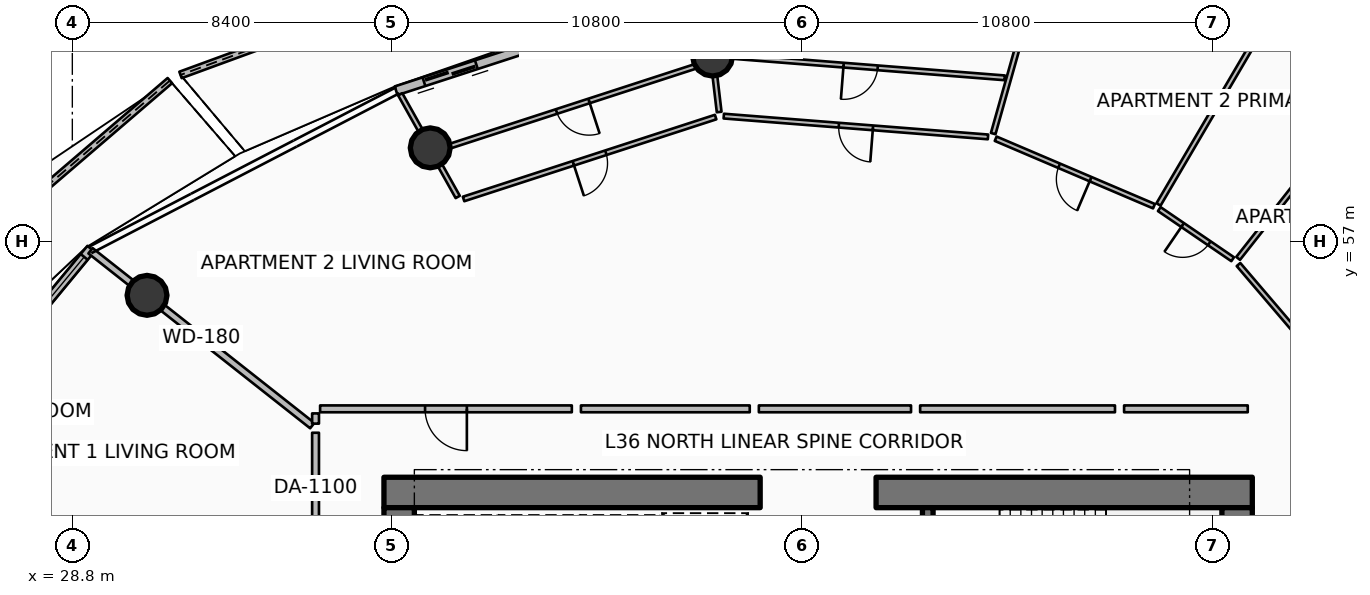
"""IFC4 building model, lengths in metres.
Left out: names, types, materials, properties, quantities, classifications, styles, units other than length and angle.
Written with IfcOpenShell. Run it as: python <this file> out.ifc"""

import sys

from ifc_helpers import new_model, si_unit, direction, frame, frame_2d, origin, origin_2d, place, context, subcontext, project, spatial, polyline, rectangle, circle, outline, extrude, element, fill, save


model = new_model("IFC4")
c1 = context("Model", 3, precision=1e-05, world=origin(), true_north=direction((0.0, 1.0)))
c2 = subcontext(c1, "Body", "Model", "MODEL_VIEW")
j1 = project(units=[si_unit("LENGTHUNIT", "METRE"), si_unit("PLANEANGLEUNIT", "RADIAN")], contexts=[c1])
p1 = place(None, origin())
s1 = spatial("IfcSite", under=j1, at=p1, CompositionType="ELEMENT")
p2 = place(p1, origin())
s2 = spatial("IfcBuilding", under=s1, at=p2, CompositionType="ELEMENT")
p3 = place(p2, frame((0.0, 0.0, 146.55)))
s3 = spatial("IfcBuildingStorey", under=s2, at=p3, CompositionType="ELEMENT", Elevation=146.55)
p4 = place(p3, frame((37.0, 50.4, 0.0), z_axis=(0.0, 0.0, 1.0), x_axis=(1.0, 0.0, 0.0)))
e1 = element("IfcWall", 1, at=p4, inside=s3, PredefinedType="SHEAR", context=c2, shape_type="SweptSolid", body=[
    extrude(rectangle(XDim=9.9, YDim=0.8, at=frame_2d((4.95, 0.0))), origin(), (0.0, 0.0, 1.0), 3.75),
])
p5 = place(p3, frame((49.95, 50.4, 0.0), z_axis=(0.0, 0.0, 1.0), x_axis=(1.0, 0.0, 0.0)))
e2 = element("IfcWall", 2, at=p5, inside=s3, PredefinedType="SHEAR", context=c2, shape_type="SweptSolid", body=[
    extrude(rectangle(XDim=9.9, YDim=0.8, at=frame_2d((4.95, 0.0))), origin(), (0.0, 0.0, 1.0), 3.75),
])
for number, where, z_axis, x_axis in (
    (3, (37.4, 34.0, 0.0), (0.0, 0.0, 1.0), (0.0, 1.0, 0.0)),
    (4, (59.45, 34.0, 0.0), (0.0, 0.0, 1.0), (0.0, 1.0, 0.0)),
):
    element("IfcWall", number, at=place(p3, frame(where, z_axis=z_axis, x_axis=x_axis)), inside=s3, PredefinedType="SHEAR", context=c2, shape_type="SweptSolid", body=[
        extrude(rectangle(XDim=16.0, YDim=0.8, at=frame_2d((8.0, 0.0))), origin(), (0.0, 0.0, 1.0), 3.75),
    ])
p6 = place(p3, frame((51.31, 46.5, 0.0), z_axis=(0.0, 0.0, 1.0), x_axis=(0.0, 1.0, 0.0)))
e5 = element("IfcWall", 5, at=p6, inside=s3, PredefinedType="SHEAR", context=c2, shape_type="SweptSolid", body=[
    extrude(rectangle(XDim=3.5, YDim=0.28, at=frame_2d((1.75, 0.0))), origin(), (0.0, 0.0, 1.0), 3.75),
])
for number, where, z_axis, x_axis in (
    (6, (45.647, 61.881, 0.0), (0.0, 0.0, 1.0), (1.0, 0.0, 0.0)),
    (7, (38.218, 59.467, 0.0), (0.0, 0.0, 1.0), (1.0, 0.0, 0.0)),
    (8, (30.766, 55.586, 0.0), (0.0, 0.0, 1.0), (1.0, 0.0, 0.0)),
):
    element("IfcColumn", number, at=place(p3, frame(where, z_axis=z_axis, x_axis=x_axis)), inside=s3, PredefinedType="COLUMN", context=c2, shape_type="SweptSolid", body=[
        extrude(circle(Radius=0.525, at=origin_2d()), origin(), (0.0, 0.0, 1.0), 3.5),
    ])
p7 = place(p3, frame((69.89, 60.928, 0.0), z_axis=(0.0, 0.0, 1.0), x_axis=(-0.890197806796, 0.455574214345, 0.0)))
e9 = element("IfcWall", 9, at=p7, inside=s3, PredefinedType="PARAPET", context=c2, shape_type="SweptSolid", body=[
    extrude(outline(polyline([(0.0, 0.0), (10.791, 0.0), (10.791, 1.148), (5.395, 1.284), (0.0, 1.483), (0.0, 0.0)])), frame((0.0, 0.09, 0.0), z_axis=(0.0, -1.0, 0.0), x_axis=(1.0, 0.0, 0.0)), (0.0, 0.0, 1.0), 0.18),
])
p8 = place(p3, frame((40.518, 64.638, 0.0), z_axis=(0.0, 0.0, 1.0), x_axis=(-0.93889246029, -0.344210615774, 0.0)))
e10 = element("IfcWall", 10, at=p8, inside=s3, PredefinedType="PARAPET", context=c2, shape_type="SweptSolid", body=[
    extrude(outline(polyline([(0.0, 0.0), (9.449, 0.0), (9.449, 1.86), (4.725, 1.798), (0.0, 1.632), (0.0, 0.0)])), frame((0.0, 0.09, 0.0), z_axis=(0.0, -1.0, 0.0), x_axis=(1.0, 0.0, 0.0)), (0.0, 0.0, 1.0), 0.18),
])
p9 = place(p3, frame((31.366, 61.237, 0.0), z_axis=(0.0, 0.0, 1.0), x_axis=(-0.758999279374, -0.651091463551, 0.0)))
e11 = element("IfcWall", 11, at=p9, inside=s3, PredefinedType="PARAPET", context=c2, shape_type="SweptSolid", body=[
    extrude(outline(polyline([(0.0, 0.0), (10.249, 0.0), (10.249, 1.632), (5.125, 1.798), (0.0, 1.86), (0.0, 0.0)])), frame((0.0, 0.09, 0.0), z_axis=(0.0, -1.0, 0.0), x_axis=(1.0, 0.0, 0.0)), (0.0, 0.0, 1.0), 0.18),
])
p10 = place(p3, frame((45.49, 63.624, 0.0), z_axis=(0.0, 0.0, 1.0), x_axis=(-0.951046390632, -0.309048156224, 0.0)))
e12 = element("IfcWall", 12, at=p10, inside=s3, PredefinedType="SOLIDWALL", context=c2, shape_type="SweptSolid", body=[
    extrude(rectangle(XDim=8.59, YDim=0.24, at=frame_2d((4.295, 0.0))), origin(), (0.0, 0.0, 1.0), 2.45),
])
p11 = place(p10, frame((6.37, 0.0, 0.0)))
e13 = element("IfcOpeningElement", 13, at=p11, cuts=e12, PredefinedType="OPENING", context=c2, shape_type="SweptSolid", body=[
    extrude(rectangle(XDim=1.45, YDim=2.15, at=frame_2d((0.725, 1.075))), frame((0.0, 0.13, 0.0), z_axis=(0.0, -1.0, 0.0), x_axis=(1.0, 0.0, 0.0)), (0.0, 0.0, 1.0), 0.26),
])
p12 = place(p10, frame((0.28, 0.0, 0.65)))
e14 = element("IfcOpeningElement", 14, at=p12, cuts=e12, PredefinedType="OPENING", context=c2, shape_type="SweptSolid", body=[
    extrude(rectangle(XDim=1.6, YDim=1.5, at=frame_2d((0.8, 0.75))), frame((0.0, 0.13, 0.0), z_axis=(0.0, -1.0, 0.0), x_axis=(1.0, 0.0, 0.0)), (0.0, 0.0, 1.0), 0.26),
])
p13 = place(p3, frame((29.291, 56.813, 0.0), z_axis=(0.0, 0.0, 1.0), x_axis=(-0.636771922292, -0.77105221547, 0.0)))
e15 = element("IfcWall", 15, at=p13, inside=s3, PredefinedType="SOLIDWALL", context=c2, shape_type="SweptSolid", body=[
    extrude(rectangle(XDim=10.082, YDim=0.24, at=frame_2d((5.041, 0.0))), origin(), (0.0, 0.0, 1.0), 2.45),
])
p14 = place(p13, frame((7.862, 0.0, 0.0)))
e16 = element("IfcOpeningElement", 16, at=p14, cuts=e15, PredefinedType="OPENING", context=c2, shape_type="SweptSolid", body=[
    extrude(rectangle(XDim=1.45, YDim=2.15, at=frame_2d((0.725, 1.075))), frame((0.0, 0.13, 0.0), z_axis=(0.0, -1.0, 0.0), x_axis=(1.0, 0.0, 0.0)), (0.0, 0.0, 1.0), 0.26),
])
p15 = place(p13, frame((0.28, 0.0, 0.65)))
e17 = element("IfcOpeningElement", 17, at=p15, cuts=e15, PredefinedType="OPENING", context=c2, shape_type="SweptSolid", body=[
    extrude(rectangle(XDim=1.6, YDim=1.5, at=frame_2d((0.8, 0.75))), frame((0.0, 0.13, 0.0), z_axis=(0.0, -1.0, 0.0), x_axis=(1.0, 0.0, 0.0)), (0.0, 0.0, 1.0), 0.26),
])
p16 = place(p3, frame((35.114, 52.159, 0.0), z_axis=(0.0, 0.0, 1.0), x_axis=(-0.78531739611, 0.619093359169, 0.0)))
e18 = element("IfcWall", 18, at=p16, inside=s3, PredefinedType="PARTITIONING", context=c2, shape_type="SweptSolid", body=[
    extrude(rectangle(XDim=7.43, YDim=0.18, at=frame_2d((3.715, 0.0))), origin(), (0.0, 0.0, 1.0), 2.94),
])
p17 = place(p3, frame((35.2, 51.971, 0.0), z_axis=(0.0, 0.0, 1.0), x_axis=(0.0, -1.0, 0.0)))
e19 = element("IfcWall", 19, at=p17, inside=s3, PredefinedType="PARTITIONING", context=c2, shape_type="SweptSolid", body=[
    extrude(rectangle(XDim=6.241, YDim=0.18, at=frame_2d((3.12, 0.0))), origin(), (0.0, 0.0, 1.0), 2.94),
])
p18 = place(p17, frame((2.57, 0.0, 0.0)))
e20 = element("IfcOpeningElement", 20, at=p18, cuts=e19, PredefinedType="OPENING", context=c2, shape_type="SweptSolid", body=[
    extrude(rectangle(XDim=1.1, YDim=2.1, at=frame_2d((0.55, 1.05))), frame((0.0, 0.1, 0.0), z_axis=(0.0, -1.0, 0.0), x_axis=(1.0, 0.0, 0.0)), (0.0, 0.0, 1.0), 0.2),
])
p19 = place(p3, frame((41.944, 52.6, 0.0), z_axis=(0.0, 0.0, 1.0), x_axis=(-1.0, 0.0, 0.0)))
e21 = element("IfcWall", 21, at=p19, inside=s3, PredefinedType="PARTITIONING", context=c2, shape_type="SweptSolid", body=[
    extrude(rectangle(XDim=6.624, YDim=0.18, at=frame_2d((3.312, 0.0))), origin(), (0.0, 0.0, 1.0), 2.94),
])
p20 = place(p19, frame((2.762, 0.0, 0.0)))
e22 = element("IfcOpeningElement", 22, at=p20, cuts=e21, PredefinedType="OPENING", context=c2, shape_type="SweptSolid", body=[
    extrude(rectangle(XDim=1.1, YDim=2.1, at=frame_2d((0.55, 1.05))), frame((0.0, 0.1, 0.0), z_axis=(0.0, -1.0, 0.0), x_axis=(1.0, 0.0, 0.0)), (0.0, 0.0, 1.0), 0.2),
])
p21 = place(p3, frame((35.2, 52.48, 0.0), z_axis=(0.0, 0.0, 1.0), x_axis=(0.0, -1.0, 0.0)))
e23 = element("IfcWall", 23, at=p21, inside=s3, PredefinedType="PARTITIONING", context=c2, shape_type="SweptSolid", body=[
    extrude(rectangle(XDim=0.269, YDim=0.18, at=frame_2d((0.135, 0.0))), origin(), (0.0, 0.0, 1.0), 2.94),
])
p22 = place(p3, frame((59.73, 52.6, 0.0), z_axis=(0.0, 0.0, 1.0), x_axis=(-1.0, 0.0, 0.0)))
e24 = element("IfcWall", 24, at=p22, inside=s3, PredefinedType="PARTITIONING", context=c2, shape_type="SweptSolid", body=[
    extrude(rectangle(XDim=3.254, YDim=0.18, at=frame_2d((1.627, 0.0))), origin(), (0.0, 0.0, 1.0), 2.94),
])
p23 = place(p3, frame((64.017, 51.093, 0.0), z_axis=(0.0, 0.0, 1.0), x_axis=(-0.649447060425, 0.76040680935, 0.0)))
e25 = element("IfcWall", 25, at=p23, inside=s3, PredefinedType="PARTITIONING", context=c2, shape_type="SweptSolid", body=[
    extrude(rectangle(XDim=6.975, YDim=0.125, at=frame_2d((3.487, 0.0))), origin(), (0.0, 0.0, 1.0), 2.94),
])
p24 = place(p23, frame((3.037, 0.0, 0.0)))
e26 = element("IfcOpeningElement", 26, at=p24, cuts=e25, PredefinedType="OPENING", context=c2, shape_type="SweptSolid", body=[
    extrude(rectangle(XDim=0.9, YDim=2.08, at=frame_2d((0.45, 1.04))), frame((0.0, 0.073, 0.0), z_axis=(0.0, -1.0, 0.0), x_axis=(1.0, 0.0, 0.0)), (0.0, 0.0, 1.0), 0.145),
])
p25 = place(p3, frame((56.236, 52.6, 0.0), z_axis=(0.0, 0.0, 1.0), x_axis=(-1.0, 0.0, 0.0)))
e27 = element("IfcWall", 27, at=p25, inside=s3, PredefinedType="PARTITIONING", context=c2, shape_type="SweptSolid", body=[
    extrude(rectangle(XDim=5.127, YDim=0.18, at=frame_2d((2.563, 0.0))), origin(), (0.0, 0.0, 1.0), 2.94),
])
p26 = place(p3, frame((59.477, 56.559, 0.0), z_axis=(0.0, 0.0, 1.0), x_axis=(0.619110986016, 0.785303499925, 0.0)))
e28 = element("IfcWall", 28, at=p26, inside=s3, PredefinedType="PARTITIONING", context=c2, shape_type="SweptSolid", body=[
    extrude(rectangle(XDim=7.513, YDim=0.125, at=frame_2d((3.756, 0.0))), origin(), (0.0, 0.0, 1.0), 2.94),
])
p27 = place(p3, frame((57.382, 57.978, 0.0), z_axis=(0.0, 0.0, 1.0), x_axis=(0.506339561396, 0.862334186128, 0.0)))
e29 = element("IfcWall", 29, at=p27, inside=s3, PredefinedType="PARTITIONING", context=c2, shape_type="SweptSolid", body=[
    extrude(rectangle(XDim=6.163, YDim=0.125, at=frame_2d((3.081, 0.0))), origin(), (0.0, 0.0, 1.0), 2.94),
])
p28 = place(p3, frame((59.333, 56.537, 0.0), z_axis=(0.0, 0.0, 1.0), x_axis=(-0.825780816813, 0.563991172434, 0.0)))
e30 = element("IfcWall", 30, at=p28, inside=s3, PredefinedType="PARTITIONING", context=c2, shape_type="SweptSolid", body=[
    extrude(rectangle(XDim=2.338, YDim=0.125, at=frame_2d((1.169, 0.0))), origin(), (0.0, 0.0, 1.0), 2.94),
])
p29 = place(p28, frame((0.744, 0.0, 0.0)))
e31 = element("IfcOpeningElement", 31, at=p29, cuts=e30, PredefinedType="OPENING", context=c2, shape_type="SweptSolid", body=[
    extrude(rectangle(XDim=0.85, YDim=2.06, at=frame_2d((0.425, 1.03))), frame((0.0, 0.073, 0.0), z_axis=(0.0, -1.0, 0.0), x_axis=(1.0, 0.0, 0.0)), (0.0, 0.0, 1.0), 0.145),
])
p30 = place(p3, frame((57.263, 57.932, 0.0), z_axis=(0.0, 0.0, 1.0), x_axis=(-0.919910192906, 0.392129107549, 0.0)))
e32 = element("IfcWall", 32, at=p30, inside=s3, PredefinedType="PARTITIONING", context=c2, shape_type="SweptSolid", body=[
    extrude(rectangle(XDim=4.528, YDim=0.125, at=frame_2d((2.264, 0.0))), origin(), (0.0, 0.0, 1.0), 2.94),
])
p31 = place(p30, frame((1.814, 0.0, 0.0)))
e33 = element("IfcOpeningElement", 33, at=p31, cuts=e32, PredefinedType="OPENING", context=c2, shape_type="SweptSolid", body=[
    extrude(rectangle(XDim=0.9, YDim=2.08, at=frame_2d((0.45, 1.04))), frame((0.0, 0.073, 0.0), z_axis=(0.0, -1.0, 0.0), x_axis=(1.0, 0.0, 0.0)), (0.0, 0.0, 1.0), 0.145),
])
p32 = place(p3, frame((50.869, 52.6, 0.0), z_axis=(0.0, 0.0, 1.0), x_axis=(-1.0, 0.0, 0.0)))
e34 = element("IfcWall", 34, at=p32, inside=s3, PredefinedType="PARTITIONING", context=c2, shape_type="SweptSolid", body=[
    extrude(rectangle(XDim=4.004, YDim=0.18, at=frame_2d((2.002, 0.0))), origin(), (0.0, 0.0, 1.0), 2.94),
])
p33 = place(p3, frame((53.032, 59.843, 0.0), z_axis=(0.0, 0.0, 1.0), x_axis=(0.271445669276, 0.962453764412, 0.0)))
e35 = element("IfcWall", 35, at=p33, inside=s3, PredefinedType="PARTITIONING", context=c2, shape_type="SweptSolid", body=[
    extrude(rectangle(XDim=5.2, YDim=0.125, at=frame_2d((2.6, 0.0))), origin(), (0.0, 0.0, 1.0), 2.94),
])
p34 = place(p3, frame((52.896, 59.755, 0.0), z_axis=(0.0, 0.0, 1.0), x_axis=(-0.996918496177, 0.078444324085, 0.0)))
e36 = element("IfcWall", 36, at=p34, inside=s3, PredefinedType="PARTITIONING", context=c2, shape_type="SweptSolid", body=[
    extrude(rectangle(XDim=6.975, YDim=0.125, at=frame_2d((3.487, 0.0))), origin(), (0.0, 0.0, 1.0), 2.94),
])
p35 = place(p34, frame((3.037, 0.0, 0.0)))
e37 = element("IfcOpeningElement", 37, at=p35, cuts=e36, PredefinedType="OPENING", context=c2, shape_type="SweptSolid", body=[
    extrude(rectangle(XDim=0.9, YDim=2.08, at=frame_2d((0.45, 1.04))), frame((0.0, 0.073, 0.0), z_axis=(0.0, -1.0, 0.0), x_axis=(1.0, 0.0, 0.0)), (0.0, 0.0, 1.0), 0.145),
])
p36 = place(p3, frame((53.334, 61.31, 0.0), z_axis=(0.0, 0.0, 1.0), x_axis=(-0.996916945499, 0.078464028559, 0.0)))
e38 = element("IfcWall", 38, at=p36, inside=s3, PredefinedType="PARTITIONING", context=c2, shape_type="SweptSolid", body=[
    extrude(rectangle(XDim=7.604, YDim=0.125, at=frame_2d((3.802, 0.0))), origin(), (0.0, 0.0, 1.0), 2.94),
])
p37 = place(p36, frame((3.352, 0.0, 0.0)))
e39 = element("IfcOpeningElement", 39, at=p37, cuts=e38, PredefinedType="OPENING", context=c2, shape_type="SweptSolid", body=[
    extrude(rectangle(XDim=0.9, YDim=2.08, at=frame_2d((0.45, 1.04))), frame((0.0, 0.073, 0.0), z_axis=(0.0, -1.0, 0.0), x_axis=(1.0, 0.0, 0.0)), (0.0, 0.0, 1.0), 0.145),
])
p38 = place(p3, frame((46.625, 52.6, 0.0), z_axis=(0.0, 0.0, 1.0), x_axis=(-1.0, 0.0, 0.0)))
e40 = element("IfcWall", 40, at=p38, inside=s3, PredefinedType="PARTITIONING", context=c2, shape_type="SweptSolid", body=[
    extrude(rectangle(XDim=4.442, YDim=0.18, at=frame_2d((2.221, 0.0))), origin(), (0.0, 0.0, 1.0), 2.94),
])
p39 = place(p3, frame((45.821, 60.41, 0.0), z_axis=(0.0, 0.0, 1.0), x_axis=(-0.117497237937, 0.993073209324, 0.0)))
e41 = element("IfcWall", 41, at=p39, inside=s3, PredefinedType="PARTITIONING", context=c2, shape_type="SweptSolid", body=[
    extrude(rectangle(XDim=3.196, YDim=0.125, at=frame_2d((1.598, 0.0))), origin(), (0.0, 0.0, 1.0), 2.94),
])
p40 = place(p3, frame((38.941, 58.175, 0.0), z_axis=(0.0, 0.0, 1.0), x_axis=(-0.488620181058, 0.872496600946, 0.0)))
e42 = element("IfcWall", 42, at=p40, inside=s3, PredefinedType="PARTITIONING", context=c2, shape_type="SweptSolid", body=[
    extrude(rectangle(XDim=3.095, YDim=0.125, at=frame_2d((1.548, 0.0))), origin(), (0.0, 0.0, 1.0), 2.94),
])
p41 = place(p3, frame((45.728, 60.277, 0.0), z_axis=(0.0, 0.0, 1.0), x_axis=(-0.951064162215, -0.308993461661, 0.0)))
e43 = element("IfcWall", 43, at=p41, inside=s3, PredefinedType="PARTITIONING", context=c2, shape_type="SweptSolid", body=[
    extrude(rectangle(XDim=6.974, YDim=0.125, at=frame_2d((3.487, 0.0))), origin(), (0.0, 0.0, 1.0), 2.94),
])
p42 = place(p41, frame((3.037, 0.0, 0.0)))
e44 = element("IfcOpeningElement", 44, at=p42, cuts=e43, PredefinedType="OPENING", context=c2, shape_type="SweptSolid", body=[
    extrude(rectangle(XDim=0.9, YDim=2.08, at=frame_2d((0.45, 1.04))), frame((0.0, 0.073, 0.0), z_axis=(0.0, -1.0, 0.0), x_axis=(1.0, 0.0, 0.0)), (0.0, 0.0, 1.0), 0.145),
])
p43 = place(p3, frame((45.556, 61.728, 0.0), z_axis=(0.0, 0.0, 1.0), x_axis=(-0.951060224054, -0.309005582834, 0.0)))
e45 = element("IfcWall", 45, at=p43, inside=s3, PredefinedType="PARTITIONING", context=c2, shape_type="SweptSolid", body=[
    extrude(rectangle(XDim=7.544, YDim=0.125, at=frame_2d((3.772, 0.0))), origin(), (0.0, 0.0, 1.0), 2.94),
])
p44 = place(p43, frame((3.322, 0.0, 0.0)))
e46 = element("IfcOpeningElement", 46, at=p44, cuts=e45, PredefinedType="OPENING", context=c2, shape_type="SweptSolid", body=[
    extrude(rectangle(XDim=0.9, YDim=2.08, at=frame_2d((0.45, 1.04))), frame((0.0, 0.073, 0.0), z_axis=(0.0, -1.0, 0.0), x_axis=(1.0, 0.0, 0.0)), (0.0, 0.0, 1.0), 0.145),
])
p45 = place(p11, origin())
e47 = element("IfcDoor", 47, at=p45, inside=s3, OperationType="DOUBLE_DOOR_SLIDING", PredefinedType="DOOR", context=c2, shape_type="SweptSolid", body=[
    extrude(rectangle(XDim=1.45, YDim=2.15, at=frame_2d((0.725, 1.075))), frame((0.0, 0.025, 0.0), z_axis=(0.0, -1.0, 0.0), x_axis=(1.0, 0.0, 0.0)), (0.0, 0.0, 1.0), 0.05),
])
fill(e13, e47)
p46 = place(p15, origin())
e48 = element("IfcWindow", 48, at=p46, inside=s3, PartitioningType="SINGLE_PANEL", PredefinedType="WINDOW", context=c2, shape_type="SweptSolid", body=[
    extrude(rectangle(XDim=1.6, YDim=1.5, at=frame_2d((0.8, 0.75))), frame((0.0, 0.03, 0.0), z_axis=(0.0, -1.0, 0.0), x_axis=(1.0, 0.0, 0.0)), (0.0, 0.0, 1.0), 0.06),
])
fill(e17, e48)
p47 = place(p20, origin())
e49 = element("IfcDoor", 49, at=p47, inside=s3, OperationType="SINGLE_SWING_LEFT", PredefinedType="DOOR", context=c2, shape_type="SweptSolid", body=[
    extrude(rectangle(XDim=1.1, YDim=2.1, at=frame_2d((0.55, 1.05))), frame((0.0, 0.025, 0.0), z_axis=(0.0, -1.0, 0.0), x_axis=(1.0, 0.0, 0.0)), (0.0, 0.0, 1.0), 0.05),
])
fill(e22, e49)
p48 = place(p29, origin())
e50 = element("IfcDoor", 50, at=p48, inside=s3, OperationType="SINGLE_SWING_RIGHT", PredefinedType="DOOR", context=c2, shape_type="SweptSolid", body=[
    extrude(rectangle(XDim=0.85, YDim=2.06, at=frame_2d((0.425, 1.03))), frame((0.0, 0.025, 0.0), z_axis=(0.0, -1.0, 0.0), x_axis=(1.0, 0.0, 0.0)), (0.0, 0.0, 1.0), 0.05),
])
fill(e31, e50)
p49 = place(p31, origin())
e51 = element("IfcDoor", 51, at=p49, inside=s3, OperationType="SINGLE_SWING_LEFT", PredefinedType="DOOR", context=c2, shape_type="SweptSolid", body=[
    extrude(rectangle(XDim=0.9, YDim=2.08, at=frame_2d((0.45, 1.04))), frame((0.0, 0.025, 0.0), z_axis=(0.0, -1.0, 0.0), x_axis=(1.0, 0.0, 0.0)), (0.0, 0.0, 1.0), 0.05),
])
fill(e33, e51)
p50 = place(p35, origin())
e52 = element("IfcDoor", 52, at=p50, inside=s3, OperationType="SINGLE_SWING_LEFT", PredefinedType="DOOR", context=c2, shape_type="SweptSolid", body=[
    extrude(rectangle(XDim=0.9, YDim=2.08, at=frame_2d((0.45, 1.04))), frame((0.0, 0.025, 0.0), z_axis=(0.0, -1.0, 0.0), x_axis=(1.0, 0.0, 0.0)), (0.0, 0.0, 1.0), 0.05),
])
fill(e37, e52)
p51 = place(p37, origin())
e53 = element("IfcDoor", 53, at=p51, inside=s3, OperationType="SINGLE_SWING_RIGHT", PredefinedType="DOOR", context=c2, shape_type="SweptSolid", body=[
    extrude(rectangle(XDim=0.9, YDim=2.08, at=frame_2d((0.45, 1.04))), frame((0.0, 0.025, 0.0), z_axis=(0.0, -1.0, 0.0), x_axis=(1.0, 0.0, 0.0)), (0.0, 0.0, 1.0), 0.05),
])
fill(e39, e53)
p52 = place(p42, origin())
e54 = element("IfcDoor", 54, at=p52, inside=s3, OperationType="SINGLE_SWING_RIGHT", PredefinedType="DOOR", context=c2, shape_type="SweptSolid", body=[
    extrude(rectangle(XDim=0.9, YDim=2.08, at=frame_2d((0.45, 1.04))), frame((0.0, 0.025, 0.0), z_axis=(0.0, -1.0, 0.0), x_axis=(1.0, 0.0, 0.0)), (0.0, 0.0, 1.0), 0.05),
])
fill(e44, e54)
p53 = place(p44, origin())
e55 = element("IfcDoor", 55, at=p53, inside=s3, OperationType="SINGLE_SWING_LEFT", PredefinedType="DOOR", context=c2, shape_type="SweptSolid", body=[
    extrude(rectangle(XDim=0.9, YDim=2.08, at=frame_2d((0.45, 1.04))), frame((0.0, 0.025, 0.0), z_axis=(0.0, -1.0, 0.0), x_axis=(1.0, 0.0, 0.0)), (0.0, 0.0, 1.0), 0.05),
])
fill(e46, e55)
save(model, sys.argv[1])
